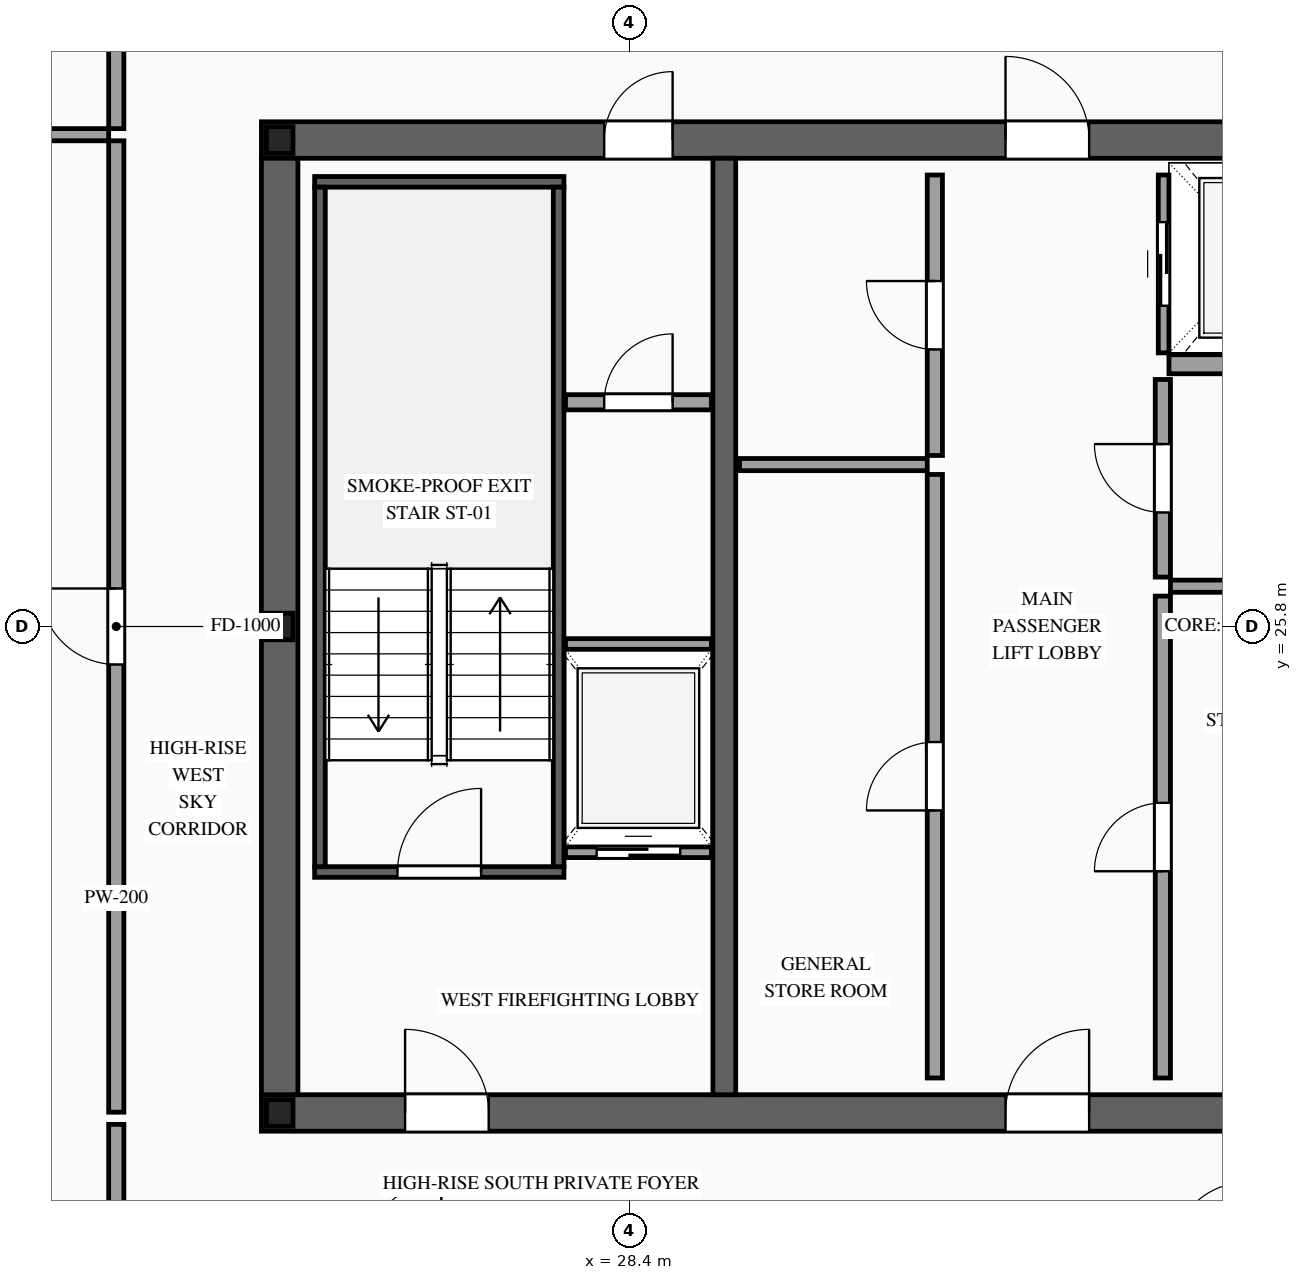
"""IFC4 building model, lengths in metres.
Left out: names, types, materials, properties, quantities, classifications, styles, units other than length and angle.
Written with IfcOpenShell. Run it as: python <this file> out.ifc"""

import sys

from ifc_helpers import new_model, si_unit, direction, frame, frame_2d, origin, origin_2d, place, context, subcontext, project, spatial, rectangle, i_section, extrude, source, transform, mapped, element, fill, save


model = new_model("IFC4")
c1 = context("Model", 3, precision=1e-05, world=origin(), true_north=direction((0.0, 1.0)))
c2 = subcontext(c1, "Body", "Model", "MODEL_VIEW")
j1 = project(units=[si_unit("LENGTHUNIT", "METRE"), si_unit("PLANEANGLEUNIT", "RADIAN")], contexts=[c1])
p1 = place(None, origin())
s1 = spatial("IfcSite", under=j1, at=p1, CompositionType="ELEMENT")
p2 = place(p1, origin())
s2 = spatial("IfcBuilding", under=s1, at=p2, CompositionType="ELEMENT")
p3 = place(p2, frame((0.0, 0.0, 314.7)))
s3 = spatial("IfcBuildingStorey", under=s2, at=p3, CompositionType="ELEMENT", Elevation=314.7)
p4 = place(p3, frame((23.56, 19.4, 0.0), z_axis=(0.0, 0.0, 1.0), x_axis=(1.0, 0.0, 0.0)))
e1 = element("IfcWall", 1, at=p4, inside=s3, PredefinedType="SHEAR", context=c2, shape_type="SweptSolid", body=[
    extrude(rectangle(XDim=26.88, YDim=0.48, at=frame_2d((13.44, 0.0))), origin(), (0.0, 0.0, 1.0), 3.5),
])
p5 = place(p4, frame((1.89, 0.0, 0.0)))
e2 = element("IfcOpeningElement", 2, at=p5, cuts=e1, PredefinedType="OPENING", context=c2, shape_type="SweptSolid", body=[
    extrude(rectangle(XDim=1.1, YDim=2.2, at=frame_2d((0.55, 1.1))), frame((0.0, 0.255, 0.0), z_axis=(0.0, -1.0, 0.0), x_axis=(1.0, 0.0, 0.0)), (0.0, 0.0, 1.0), 0.51),
])
p6 = place(p4, frame((9.79, 0.0, 0.0)))
e3 = element("IfcOpeningElement", 3, at=p6, cuts=e1, PredefinedType="OPENING", context=c2, shape_type="SweptSolid", body=[
    extrude(rectangle(XDim=1.1, YDim=2.2, at=frame_2d((0.55, 1.1))), frame((0.0, 0.255, 0.0), z_axis=(0.0, -1.0, 0.0), x_axis=(1.0, 0.0, 0.0)), (0.0, 0.0, 1.0), 0.51),
])
p7 = place(p4, frame((22.99, 0.0, 0.0)))
e4 = element("IfcOpeningElement", 4, at=p7, cuts=e1, PredefinedType="OPENING", context=c2, shape_type="SweptSolid", body=[
    extrude(rectangle(XDim=1.1, YDim=2.2, at=frame_2d((0.55, 1.1))), frame((0.0, 0.255, 0.0), z_axis=(0.0, -1.0, 0.0), x_axis=(1.0, 0.0, 0.0)), (0.0, 0.0, 1.0), 0.51),
])
p8 = place(p4, frame((19.61, 0.0, 0.0)))
e5 = element("IfcOpeningElement", 5, at=p8, cuts=e1, PredefinedType="OPENING", context=c2, shape_type="SweptSolid", body=[
    extrude(rectangle(XDim=0.9, YDim=2.15, at=frame_2d((0.45, 1.075))), frame((0.0, 0.255, 0.0), z_axis=(0.0, -1.0, 0.0), x_axis=(1.0, 0.0, 0.0)), (0.0, 0.0, 1.0), 0.51),
])
p9 = place(p4, frame((18.17, 0.0, 0.0)))
e6 = element("IfcOpeningElement", 6, at=p9, cuts=e1, PredefinedType="OPENING", context=c2, shape_type="SweptSolid", body=[
    extrude(rectangle(XDim=0.9, YDim=2.15, at=frame_2d((0.45, 1.075))), frame((0.0, 0.255, 0.0), z_axis=(0.0, -1.0, 0.0), x_axis=(1.0, 0.0, 0.0)), (0.0, 0.0, 1.0), 0.51),
])
p10 = place(p3, frame((23.56, 32.2, 0.0), z_axis=(0.0, 0.0, 1.0), x_axis=(1.0, 0.0, 0.0)))
e7 = element("IfcWall", 7, at=p10, inside=s3, PredefinedType="SHEAR", context=c2, shape_type="SweptSolid", body=[
    extrude(rectangle(XDim=26.88, YDim=0.48, at=frame_2d((13.44, 0.0))), origin(), (0.0, 0.0, 1.0), 3.5),
])
p11 = place(p10, frame((4.51, 0.0, 0.0)))
e8 = element("IfcOpeningElement", 8, at=p11, cuts=e7, PredefinedType="OPENING", context=c2, shape_type="SweptSolid", body=[
    extrude(rectangle(XDim=0.9, YDim=2.15, at=frame_2d((0.45, 1.075))), frame((0.0, 0.255, 0.0), z_axis=(0.0, -1.0, 0.0), x_axis=(1.0, 0.0, 0.0)), (0.0, 0.0, 1.0), 0.51),
])
p12 = place(p10, frame((9.79, 0.0, 0.0)))
e9 = element("IfcOpeningElement", 9, at=p12, cuts=e7, PredefinedType="OPENING", context=c2, shape_type="SweptSolid", body=[
    extrude(rectangle(XDim=1.1, YDim=2.2, at=frame_2d((0.55, 1.1))), frame((0.0, 0.255, 0.0), z_axis=(0.0, -1.0, 0.0), x_axis=(1.0, 0.0, 0.0)), (0.0, 0.0, 1.0), 0.51),
])
p13 = place(p10, frame((15.64, 0.0, 0.0)))
e10 = element("IfcOpeningElement", 10, at=p13, cuts=e7, PredefinedType="OPENING", context=c2, shape_type="SweptSolid", body=[
    extrude(rectangle(XDim=1.1, YDim=2.2, at=frame_2d((0.55, 1.1))), frame((0.0, 0.255, 0.0), z_axis=(0.0, -1.0, 0.0), x_axis=(1.0, 0.0, 0.0)), (0.0, 0.0, 1.0), 0.51),
])
p14 = place(p10, frame((18.74, 0.0, 0.0)))
e11 = element("IfcOpeningElement", 11, at=p14, cuts=e7, PredefinedType="OPENING", context=c2, shape_type="SweptSolid", body=[
    extrude(rectangle(XDim=1.1, YDim=2.2, at=frame_2d((0.55, 1.1))), frame((0.0, 0.255, 0.0), z_axis=(0.0, -1.0, 0.0), x_axis=(1.0, 0.0, 0.0)), (0.0, 0.0, 1.0), 0.51),
])
m1 = source(origin(), c2, "Body", "SweptSolid", [
    extrude(rectangle(XDim=12.32, YDim=0.48, at=frame_2d((6.16, 0.0))), origin(), (0.0, 0.0, 1.0), 3.5),
])
p15 = place(p3, frame((23.8, 19.64, 0.0), z_axis=(0.0, 0.0, 1.0), x_axis=(0.0, 1.0, 0.0)))
e12 = element("IfcWall", 12, at=p15, inside=s3, PredefinedType="SHEAR", context=c2, shape_type="MappedRepresentation", body=[
    mapped(m1, transform((0.0, 0.0, 0.0), scale=1.0)),
])
m2 = source(origin(), c2, "Body", "SweptSolid", [
    extrude(rectangle(XDim=12.32, YDim=0.3, at=frame_2d((6.16, 0.0))), origin(), (0.0, 0.0, 1.0), 3.5),
])
p16 = place(p3, frame((29.65, 19.64, 0.0), z_axis=(0.0, 0.0, 1.0), x_axis=(0.0, 1.0, 0.0)))
e13 = element("IfcWall", 13, at=p16, inside=s3, PredefinedType="SOLIDWALL", context=c2, shape_type="MappedRepresentation", body=[
    mapped(m2, transform((0.0, 0.0, 0.0), scale=1.0)),
])
m3 = source(origin(), c2, "Body", "SweptSolid", [
    extrude(i_section(OverallWidth=0.35, OverallDepth=0.35, WebThickness=0.012, FlangeThickness=0.019, at=origin_2d()), origin(), (0.0, 0.0, 1.0), 3.5),
])
for number, where, z_axis, x_axis in (
    (14, (23.8, 19.4, 0.0), (0.0, 0.0, 1.0), (1.0, 0.0, 0.0)),
    (15, (23.8, 25.8, 0.0), (0.0, 0.0, 1.0), (1.0, 0.0, 0.0)),
    (16, (23.8, 32.2, 0.0), (0.0, 0.0, 1.0), (1.0, 0.0, 0.0)),
):
    element("IfcColumn", number, at=place(p3, frame(where, z_axis=z_axis, x_axis=x_axis)), inside=s3, PredefinedType="COLUMN", context=c2, shape_type="MappedRepresentation", body=[
        mapped(m3, transform((0.0, 0.0, 0.0), scale=1.0)),
    ])
p17 = place(p3, frame((27.56, 22.83, 0.0), z_axis=(0.0, 0.0, 1.0), x_axis=(1.0, 0.0, 0.0)))
e17 = element("IfcWall", 17, at=p17, inside=s3, PredefinedType="SOLIDWALL", context=c2, shape_type="SweptSolid", body=[
    extrude(rectangle(XDim=1.92, YDim=0.14, at=frame_2d((0.96, 0.0))), origin(), (0.0, 0.0, 1.0), 3.28),
])
p18 = place(p17, frame((0.41, 0.0, 0.0)))
e18 = element("IfcOpeningElement", 18, at=p18, cuts=e17, PredefinedType="OPENING", context=c2, shape_type="SweptSolid", body=[
    extrude(rectangle(XDim=1.1, YDim=2.2, at=frame_2d((0.55, 1.1))), frame((0.0, 0.085, 0.0), z_axis=(0.0, -1.0, 0.0), x_axis=(1.0, 0.0, 0.0)), (0.0, 0.0, 1.0), 0.17),
])
m4 = source(origin(), c2, "Body", "SweptSolid", [
    extrude(rectangle(XDim=1.92, YDim=0.14, at=frame_2d((0.96, 0.0))), origin(), (0.0, 0.0, 1.0), 3.28),
])
p19 = place(p3, frame((27.56, 25.57, 0.0), z_axis=(0.0, 0.0, 1.0), x_axis=(1.0, 0.0, 0.0)))
e19 = element("IfcWall", 19, at=p19, inside=s3, PredefinedType="SOLIDWALL", context=c2, shape_type="MappedRepresentation", body=[
    mapped(m4, transform((0.0, 0.0, 0.0), scale=1.0)),
])
p20 = place(p3, frame((35.43, 29.4, 0.0), z_axis=(0.0, 0.0, 1.0), x_axis=(0.0, 1.0, 0.0)))
e20 = element("IfcWall", 20, at=p20, inside=s3, PredefinedType="SOLIDWALL", context=c2, shape_type="SweptSolid", body=[
    extrude(rectangle(XDim=2.34, YDim=0.14, at=frame_2d((1.17, 0.0))), origin(), (0.0, 0.0, 1.0), 3.28),
])
p21 = place(p20, frame((0.62, 0.0, 0.0)))
e21 = element("IfcOpeningElement", 21, at=p21, cuts=e20, PredefinedType="OPENING", context=c2, shape_type="SweptSolid", body=[
    extrude(rectangle(XDim=1.1, YDim=2.2, at=frame_2d((0.55, 1.1))), frame((0.0, 0.085, 0.0), z_axis=(0.0, -1.0, 0.0), x_axis=(1.0, 0.0, 0.0)), (0.0, 0.0, 1.0), 0.17),
])
m5 = source(origin(), c2, "Body", "SweptSolid", [
    extrude(rectangle(XDim=2.4, YDim=0.25, at=frame_2d((1.2, 0.0))), origin(), (0.0, 0.0, 1.0), 3.28),
])
p22 = place(p3, frame((35.5, 29.25, 0.0), z_axis=(0.0, 0.0, 1.0), x_axis=(1.0, 0.0, 0.0)))
e22 = element("IfcWall", 22, at=p22, inside=s3, PredefinedType="SOLIDWALL", context=c2, shape_type="MappedRepresentation", body=[
    mapped(m5, transform((0.0, 0.0, 0.0), scale=1.0)),
])
p23 = place(p3, frame((24.26, 22.57, 0.0), z_axis=(0.0, 0.0, 1.0), x_axis=(1.0, 0.0, 0.0)))
e23 = element("IfcWall", 23, at=p23, inside=s3, PredefinedType="SOLIDWALL", context=c2, shape_type="SweptSolid", body=[
    extrude(rectangle(XDim=3.28, YDim=0.14, at=frame_2d((1.64, 0.0))), origin(), (0.0, 0.0, 1.0), 3.28),
])
p24 = place(p23, frame((1.09, 0.0, 0.0)))
e24 = element("IfcOpeningElement", 24, at=p24, cuts=e23, PredefinedType="OPENING", context=c2, shape_type="SweptSolid", body=[
    extrude(rectangle(XDim=1.1, YDim=2.2, at=frame_2d((0.55, 1.1))), frame((0.0, 0.085, 0.0), z_axis=(0.0, -1.0, 0.0), x_axis=(1.0, 0.0, 0.0)), (0.0, 0.0, 1.0), 0.17),
])
m6 = source(origin(), c2, "Body", "SweptSolid", [
    extrude(rectangle(XDim=3.28, YDim=0.14, at=frame_2d((1.64, 0.0))), origin(), (0.0, 0.0, 1.0), 3.28),
])
p25 = place(p3, frame((24.26, 31.65, 0.0), z_axis=(0.0, 0.0, 1.0), x_axis=(1.0, 0.0, 0.0)))
e25 = element("IfcWall", 25, at=p25, inside=s3, PredefinedType="SOLIDWALL", context=c2, shape_type="MappedRepresentation", body=[
    mapped(m6, transform((0.0, 0.0, 0.0), scale=1.0)),
])
m7 = source(origin(), c2, "Body", "SweptSolid", [
    extrude(rectangle(XDim=8.94, YDim=0.14, at=frame_2d((4.47, 0.0))), origin(), (0.0, 0.0, 1.0), 3.28),
])
for number, where, z_axis, x_axis in (
    (26, (24.33, 22.64, 0.0), (0.0, 0.0, 1.0), (0.0, 1.0, 0.0)),
    (27, (27.47, 22.64, 0.0), (0.0, 0.0, 1.0), (0.0, 1.0, 0.0)),
):
    element("IfcWall", number, at=place(p3, frame(where, z_axis=z_axis, x_axis=x_axis)), inside=s3, PredefinedType="SOLIDWALL", context=c2, shape_type="MappedRepresentation", body=[
        mapped(m7, transform((0.0, 0.0, 0.0), scale=1.0)),
    ])
p26 = place(p3, frame((27.56, 28.75, 0.0), z_axis=(0.0, 0.0, 1.0), x_axis=(1.0, 0.0, 0.0)))
e28 = element("IfcWall", 28, at=p26, inside=s3, PredefinedType="PARTITIONING", context=c2, shape_type="SweptSolid", body=[
    extrude(rectangle(XDim=1.92, YDim=0.2, at=frame_2d((0.96, 0.0))), origin(), (0.0, 0.0, 1.0), 3.28),
])
p27 = place(p26, frame((0.51, 0.0, 0.0)))
e29 = element("IfcOpeningElement", 29, at=p27, cuts=e28, PredefinedType="OPENING", context=c2, shape_type="SweptSolid", body=[
    extrude(rectangle(XDim=0.9, YDim=2.15, at=frame_2d((0.45, 1.075))), frame((0.0, 0.115, 0.0), z_axis=(0.0, -1.0, 0.0), x_axis=(1.0, 0.0, 0.0)), (0.0, 0.0, 1.0), 0.23),
])
p28 = place(p3, frame((32.42, 19.86, 0.0), z_axis=(0.0, 0.0, 1.0), x_axis=(0.0, 1.0, 0.0)))
e30 = element("IfcWall", 30, at=p28, inside=s3, PredefinedType="PARTITIONING", context=c2, shape_type="SweptSolid", body=[
    extrude(rectangle(XDim=7.94, YDim=0.2, at=frame_2d((3.97, 0.0))), origin(), (0.0, 0.0, 1.0), 3.28),
])
p29 = place(p28, frame((3.52, 0.0, 0.0)))
e31 = element("IfcOpeningElement", 31, at=p29, cuts=e30, PredefinedType="OPENING", context=c2, shape_type="SweptSolid", body=[
    extrude(rectangle(XDim=0.9, YDim=2.15, at=frame_2d((0.45, 1.075))), frame((0.0, 0.115, 0.0), z_axis=(0.0, -1.0, 0.0), x_axis=(1.0, 0.0, 0.0)), (0.0, 0.0, 1.0), 0.23),
])
p30 = place(p3, frame((32.42, 28.05, 0.0), z_axis=(0.0, 0.0, 1.0), x_axis=(0.0, 1.0, 0.0)))
e32 = element("IfcWall", 32, at=p30, inside=s3, PredefinedType="PARTITIONING", context=c2, shape_type="SweptSolid", body=[
    extrude(rectangle(XDim=3.69, YDim=0.2, at=frame_2d((1.845, 0.0))), origin(), (0.0, 0.0, 1.0), 3.28),
])
p31 = place(p30, frame((1.395, 0.0, 0.0)))
e33 = element("IfcOpeningElement", 33, at=p31, cuts=e32, PredefinedType="OPENING", context=c2, shape_type="SweptSolid", body=[
    extrude(rectangle(XDim=0.9, YDim=2.15, at=frame_2d((0.45, 1.075))), frame((0.0, 0.115, 0.0), z_axis=(0.0, -1.0, 0.0), x_axis=(1.0, 0.0, 0.0)), (0.0, 0.0, 1.0), 0.23),
])
m8 = source(origin(), c2, "Body", "SweptSolid", [
    extrude(rectangle(XDim=2.47, YDim=0.16, at=frame_2d((1.235, 0.0))), origin(), (0.0, 0.0, 1.0), 3.28),
])
p32 = place(p3, frame((29.85, 27.93, 0.0), z_axis=(0.0, 0.0, 1.0), x_axis=(1.0, 0.0, 0.0)))
e34 = element("IfcWall", 34, at=p32, inside=s3, PredefinedType="PARTITIONING", context=c2, shape_type="MappedRepresentation", body=[
    mapped(m8, transform((0.0, 0.0, 0.0), scale=1.0)),
])
p33 = place(p3, frame((35.42, 19.86, 0.0), z_axis=(0.0, 0.0, 1.0), x_axis=(0.0, 1.0, 0.0)))
e35 = element("IfcWall", 35, at=p33, inside=s3, PredefinedType="PARTITIONING", context=c2, shape_type="SweptSolid", body=[
    extrude(rectangle(XDim=6.34, YDim=0.2, at=frame_2d((3.17, 0.0))), origin(), (0.0, 0.0, 1.0), 3.28),
])
p34 = place(p33, frame((2.72, 0.0, 0.0)))
e36 = element("IfcOpeningElement", 36, at=p34, cuts=e35, PredefinedType="OPENING", context=c2, shape_type="SweptSolid", body=[
    extrude(rectangle(XDim=0.9, YDim=2.15, at=frame_2d((0.45, 1.075))), frame((0.0, 0.115, 0.0), z_axis=(0.0, -1.0, 0.0), x_axis=(1.0, 0.0, 0.0)), (0.0, 0.0, 1.0), 0.23),
])
p35 = place(p3, frame((35.42, 26.45, 0.0), z_axis=(0.0, 0.0, 1.0), x_axis=(0.0, 1.0, 0.0)))
e37 = element("IfcWall", 37, at=p35, inside=s3, PredefinedType="PARTITIONING", context=c2, shape_type="SweptSolid", body=[
    extrude(rectangle(XDim=2.6, YDim=0.2, at=frame_2d((1.3, 0.0))), origin(), (0.0, 0.0, 1.0), 3.28),
])
p36 = place(p35, frame((0.85, 0.0, 0.0)))
e38 = element("IfcOpeningElement", 38, at=p36, cuts=e37, PredefinedType="OPENING", context=c2, shape_type="SweptSolid", body=[
    extrude(rectangle(XDim=0.9, YDim=2.15, at=frame_2d((0.45, 1.075))), frame((0.0, 0.115, 0.0), z_axis=(0.0, -1.0, 0.0), x_axis=(1.0, 0.0, 0.0)), (0.0, 0.0, 1.0), 0.23),
])
m9 = source(origin(), c2, "Body", "SweptSolid", [
    extrude(rectangle(XDim=2.36, YDim=0.16, at=frame_2d((1.18, 0.0))), origin(), (0.0, 0.0, 1.0), 3.28),
])
p37 = place(p3, frame((35.52, 26.33, 0.0), z_axis=(0.0, 0.0, 1.0), x_axis=(1.0, 0.0, 0.0)))
e39 = element("IfcWall", 39, at=p37, inside=s3, PredefinedType="PARTITIONING", context=c2, shape_type="MappedRepresentation", body=[
    mapped(m9, transform((0.0, 0.0, 0.0), scale=1.0)),
])
m10 = source(origin(), c2, "Body", "SweptSolid", [
    extrude(rectangle(XDim=1.7, YDim=0.2, at=frame_2d((0.85, 0.0))), origin(), (0.0, 0.0, 1.0), 3.28),
])
for number, where, z_axis, x_axis in (
    (40, (21.65, 32.35, 0.0), (0.0, 0.0, 1.0), (0.0, 1.0, 0.0)),
    (41, (21.65, 17.55, 0.0), (0.0, 0.0, 1.0), (0.0, 1.0, 0.0)),
):
    element("IfcWall", number, at=place(p3, frame(where, z_axis=z_axis, x_axis=x_axis)), inside=s3, PredefinedType="PARTITIONING", context=c2, shape_type="MappedRepresentation", body=[
        mapped(m10, transform((0.0, 0.0, 0.0), scale=1.0)),
    ])
p38 = place(p3, frame((21.65, 19.41, 0.0), z_axis=(0.0, 0.0, 1.0), x_axis=(0.0, 1.0, 0.0)))
e42 = element("IfcWall", 42, at=p38, inside=s3, PredefinedType="PARTITIONING", context=c2, shape_type="SweptSolid", body=[
    extrude(rectangle(XDim=12.78, YDim=0.2, at=frame_2d((6.39, 0.0))), origin(), (0.0, 0.0, 1.0), 3.28),
])
p39 = place(p38, frame((5.89, 0.0, 0.0)))
e43 = element("IfcOpeningElement", 43, at=p39, cuts=e42, PredefinedType="OPENING", context=c2, shape_type="SweptSolid", body=[
    extrude(rectangle(XDim=1.0, YDim=2.2, at=frame_2d((0.5, 1.1))), frame((0.0, 0.115, 0.0), z_axis=(0.0, -1.0, 0.0), x_axis=(1.0, 0.0, 0.0)), (0.0, 0.0, 1.0), 0.23),
])
m11 = source(origin(), c2, "Body", "SweptSolid", [
    extrude(rectangle(XDim=3.5, YDim=0.16, at=frame_2d((1.75, 0.0))), origin(), (0.0, 0.0, 1.0), 2.825),
])
p40 = place(p3, frame((18.05, 32.27, 0.0), z_axis=(0.0, 0.0, 1.0), x_axis=(1.0, 0.0, 0.0)))
e44 = element("IfcWall", 44, at=p40, inside=s3, PredefinedType="PARTITIONING", context=c2, shape_type="MappedRepresentation", body=[
    mapped(m11, transform((0.0, 0.0, 0.0), scale=1.0)),
])
m12 = source(origin(), c2, "Body", "SweptSolid", [
    extrude(rectangle(XDim=1.1, YDim=2.2, at=frame_2d((0.55, 1.1))), frame((0.0, 0.025, 0.0), z_axis=(0.0, -1.0, 0.0), x_axis=(1.0, 0.0, 0.0)), (0.0, 0.0, 1.0), 0.05),
])
p41 = place(p18, origin())
e45 = element("IfcDoor", 45, at=p41, inside=s3, OperationType="SLIDING_TO_LEFT", PredefinedType="DOOR", context=c2, shape_type="MappedRepresentation", body=[
    mapped(m12, transform((0.0, 0.0, 0.0), scale=1.0)),
])
fill(e18, e45)
p42 = place(p21, origin())
e46 = element("IfcDoor", 46, at=p42, inside=s3, OperationType="SLIDING_TO_RIGHT", PredefinedType="DOOR", context=c2, shape_type="MappedRepresentation", body=[
    mapped(m12, transform((0.0, 0.0, 0.0), scale=1.0)),
])
fill(e21, e46)
m13 = source(origin(), c2, "Body", "SweptSolid", [
    extrude(rectangle(XDim=1.1, YDim=2.2, at=frame_2d((0.55, 1.1))), frame((0.0, 0.025, 0.0), z_axis=(0.0, -1.0, 0.0), x_axis=(1.0, 0.0, 0.0)), (0.0, 0.0, 1.0), 0.05),
])
p43 = place(p24, origin())
e47 = element("IfcDoor", 47, at=p43, inside=s3, OperationType="SINGLE_SWING_RIGHT", PredefinedType="DOOR", context=c2, shape_type="MappedRepresentation", body=[
    mapped(m13, transform((0.0, 0.0, 0.0), scale=1.0)),
])
fill(e24, e47)
p44 = place(p5, origin())
e48 = element("IfcDoor", 48, at=p44, inside=s3, OperationType="SINGLE_SWING_LEFT", PredefinedType="DOOR", context=c2, shape_type="MappedRepresentation", body=[
    mapped(m13, transform((0.0, 0.0, 0.0), scale=1.0)),
])
fill(e2, e48)
p45 = place(p6, origin())
e49 = element("IfcDoor", 49, at=p45, inside=s3, OperationType="SINGLE_SWING_RIGHT", PredefinedType="DOOR", context=c2, shape_type="MappedRepresentation", body=[
    mapped(m13, transform((0.0, 0.0, 0.0), scale=1.0)),
])
fill(e3, e49)
m14 = source(origin(), c2, "Body", "SweptSolid", [
    extrude(rectangle(XDim=0.9, YDim=2.15, at=frame_2d((0.45, 1.075))), frame((0.0, 0.025, 0.0), z_axis=(0.0, -1.0, 0.0), x_axis=(1.0, 0.0, 0.0)), (0.0, 0.0, 1.0), 0.05),
])
p46 = place(p11, origin())
e50 = element("IfcDoor", 50, at=p46, inside=s3, OperationType="SINGLE_SWING_RIGHT", PredefinedType="DOOR", context=c2, shape_type="MappedRepresentation", body=[
    mapped(m14, transform((0.0, 0.0, 0.0), scale=1.0)),
])
fill(e8, e50)
p47 = place(p12, origin())
e51 = element("IfcDoor", 51, at=p47, inside=s3, OperationType="SINGLE_SWING_LEFT", PredefinedType="DOOR", context=c2, shape_type="MappedRepresentation", body=[
    mapped(m13, transform((0.0, 0.0, 0.0), scale=1.0)),
])
fill(e9, e51)
p48 = place(p27, origin())
e52 = element("IfcDoor", 52, at=p48, inside=s3, OperationType="SINGLE_SWING_RIGHT", PredefinedType="DOOR", context=c2, shape_type="MappedRepresentation", body=[
    mapped(m14, transform((0.0, 0.0, 0.0), scale=1.0)),
])
fill(e29, e52)
p49 = place(p29, origin())
e53 = element("IfcDoor", 53, at=p49, inside=s3, OperationType="SINGLE_SWING_LEFT", PredefinedType="DOOR", context=c2, shape_type="MappedRepresentation", body=[
    mapped(m14, transform((0.0, 0.0, 0.0), scale=1.0)),
])
fill(e31, e53)
p50 = place(p31, origin())
e54 = element("IfcDoor", 54, at=p50, inside=s3, OperationType="SINGLE_SWING_RIGHT", PredefinedType="DOOR", context=c2, shape_type="MappedRepresentation", body=[
    mapped(m14, transform((0.0, 0.0, 0.0), scale=1.0)),
])
fill(e33, e54)
p51 = place(p34, origin())
e55 = element("IfcDoor", 55, at=p51, inside=s3, OperationType="SINGLE_SWING_LEFT", PredefinedType="DOOR", context=c2, shape_type="MappedRepresentation", body=[
    mapped(m14, transform((0.0, 0.0, 0.0), scale=1.0)),
])
fill(e36, e55)
p52 = place(p36, origin())
e56 = element("IfcDoor", 56, at=p52, inside=s3, OperationType="SINGLE_SWING_RIGHT", PredefinedType="DOOR", context=c2, shape_type="MappedRepresentation", body=[
    mapped(m14, transform((0.0, 0.0, 0.0), scale=1.0)),
])
fill(e38, e56)
m15 = source(origin(), c2, "Body", "SweptSolid", [
    extrude(rectangle(XDim=1.0, YDim=2.2, at=frame_2d((0.5, 1.1))), frame((0.0, 0.025, 0.0), z_axis=(0.0, -1.0, 0.0), x_axis=(1.0, 0.0, 0.0)), (0.0, 0.0, 1.0), 0.05),
])
p53 = place(p39, origin())
e57 = element("IfcDoor", 57, at=p53, inside=s3, OperationType="SINGLE_SWING_RIGHT", PredefinedType="DOOR", context=c2, shape_type="MappedRepresentation", body=[
    mapped(m15, transform((0.0, 0.0, 0.0), scale=1.0)),
])
fill(e43, e57)
save(model, sys.argv[1])
